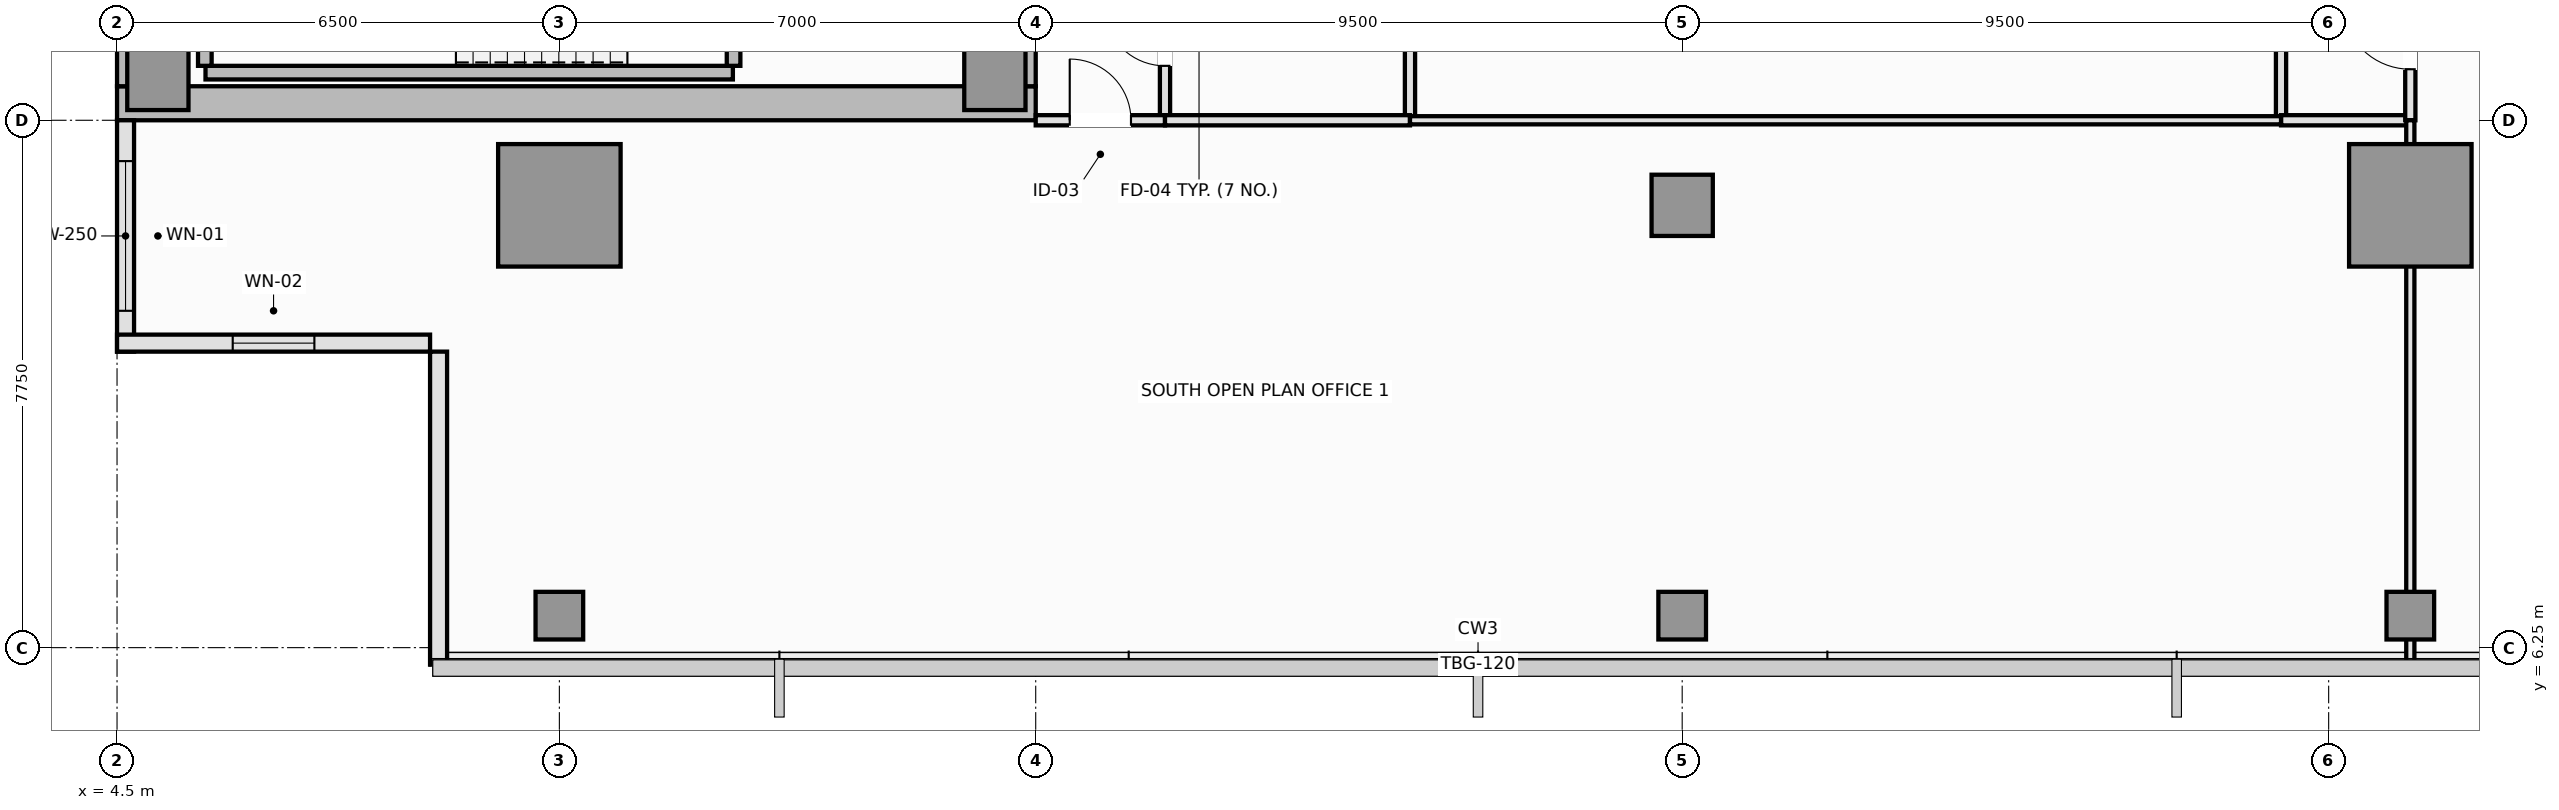
"""IFC4 building model, lengths in metres.
Left out: names, types, materials, properties, quantities, classifications, styles, units other than length and angle.
Written with IfcOpenShell. Run it as: python <this file> out.ifc"""

import sys

from ifc_helpers import new_model, si_unit, direction, frame, frame_2d, origin, origin_2d, place, context, subcontext, project, spatial, rectangle, extrude, element, fill, save


model = new_model("IFC4")
c1 = context("Model", 3, precision=1e-05, world=origin(), true_north=direction((0.0, 1.0)))
c2 = subcontext(c1, "Body", "Model", "MODEL_VIEW")
j1 = project(units=[si_unit("LENGTHUNIT", "METRE"), si_unit("PLANEANGLEUNIT", "RADIAN")], contexts=[c1])
p1 = place(None, origin())
s1 = spatial("IfcSite", under=j1, at=p1, CompositionType="ELEMENT")
p2 = place(p1, origin())
s2 = spatial("IfcBuilding", under=s1, at=p2, CompositionType="ELEMENT")
p3 = place(p2, frame((0.0, 0.0, 284.75)))
s3 = spatial("IfcBuildingStorey", under=s2, at=p3, CompositionType="ELEMENT", Elevation=284.75)
p4 = place(p3, frame((4.5, 14.25, 0.0), z_axis=(0.0, 0.0, 1.0), x_axis=(1.0, 0.0, 0.0)))
e1 = element("IfcWall", 1, at=p4, inside=s3, PredefinedType="SHEAR", context=c2, shape_type="SweptSolid", body=[
    extrude(rectangle(XDim=13.5, YDim=0.5, at=frame_2d((6.75, 0.0))), origin(), (0.0, 0.0, 1.0), 3.55),
])
p5 = place(p3, frame((4.75, 14.5, 0.0), z_axis=(0.0, 0.0, 1.0), x_axis=(0.0, 1.0, 0.0)))
e2 = element("IfcWall", 2, at=p5, inside=s3, PredefinedType="SHEAR", context=c2, shape_type="SweptSolid", body=[
    extrude(rectangle(XDim=21.5, YDim=0.5, at=frame_2d((10.75, 0.0))), origin(), (0.0, 0.0, 1.0), 3.55),
])
p6 = place(p3, frame((17.75, 14.5, 0.0), z_axis=(0.0, 0.0, 1.0), x_axis=(0.0, 1.0, 0.0)))
e3 = element("IfcWall", 3, at=p6, inside=s3, PredefinedType="SHEAR", context=c2, shape_type="SweptSolid", body=[
    extrude(rectangle(XDim=8.95, YDim=0.5, at=frame_2d((4.475, 0.0))), origin(), (0.0, 0.0, 1.0), 3.55),
])
p7 = place(p6, frame((4.4, 0.0, 0.0)))
e4 = element("IfcOpeningElement", 4, at=p7, cuts=e3, PredefinedType="OPENING", context=c2, shape_type="SweptSolid", body=[
    extrude(rectangle(XDim=1.1, YDim=2.15, at=frame_2d((0.55, 1.075))), frame((0.0, 0.26, 0.0), z_axis=(0.0, -1.0, 0.0), x_axis=(1.0, 0.0, 0.0)), (0.0, 0.0, 1.0), 0.52),
])
for number, where, z_axis, x_axis in (
    (5, (5.1, 14.6, 0.0), (0.0, 0.0, 1.0), (1.0, 0.0, 0.0)),
    (6, (17.4, 14.6, 0.0), (0.0, 0.0, 1.0), (1.0, 0.0, 0.0)),
):
    element("IfcColumn", number, at=place(p3, frame(where, z_axis=z_axis, x_axis=x_axis)), inside=s3, PredefinedType="PILASTER", context=c2, shape_type="SweptSolid", body=[
        extrude(rectangle(XDim=0.9, YDim=0.9, at=origin_2d()), origin(), (0.0, 0.0, 1.0), 3.55),
    ])
for number, where, z_axis, x_axis in (
    (7, (11.0, 12.75, 0.0), (0.0, 0.0, 1.0), (1.0, 0.0, 0.0)),
    (8, (38.2, 12.75, 0.0), (0.0, 0.0, 1.0), (1.0, 0.0, 0.0)),
):
    element("IfcColumn", number, at=place(p3, frame(where, z_axis=z_axis, x_axis=x_axis)), inside=s3, PredefinedType="COLUMN", context=c2, shape_type="SweptSolid", body=[
        extrude(rectangle(XDim=1.8, YDim=1.8, at=origin_2d()), origin(), (0.0, 0.0, 1.0), 3.55),
    ])
p8 = place(p3, frame((27.5, 12.75, 0.0), z_axis=(0.0, 0.0, 1.0), x_axis=(1.0, 0.0, 0.0)))
e9 = element("IfcColumn", 9, at=p8, inside=s3, PredefinedType="COLUMN", context=c2, shape_type="SweptSolid", body=[
    extrude(rectangle(XDim=0.9, YDim=0.9, at=origin_2d()), origin(), (0.0, 0.0, 1.0), 3.55),
])
for number, where, z_axis, x_axis in (
    (10, (11.0, 6.72, 0.0), (0.0, 0.0, 1.0), (1.0, 0.0, 0.0)),
    (11, (27.5, 6.72, 0.0), (0.0, 0.0, 1.0), (1.0, 0.0, 0.0)),
    (12, (38.2, 6.72, 0.0), (0.0, 0.0, 1.0), (1.0, 0.0, 0.0)),
):
    element("IfcColumn", number, at=place(p3, frame(where, z_axis=z_axis, x_axis=x_axis)), inside=s3, PredefinedType="COLUMN", context=c2, shape_type="SweptSolid", body=[
        extrude(rectangle(XDim=0.7, YDim=0.7, at=origin_2d()), origin(), (0.0, 0.0, 1.0), 3.55),
    ])
p9 = place(p3, frame((4.625, 14.0, 0.0), z_axis=(0.0, 0.0, 1.0), x_axis=(0.0, -1.0, 0.0)))
e13 = element("IfcWall", 13, at=p9, inside=s3, PredefinedType="SOLIDWALL", context=c2, shape_type="SweptSolid", body=[
    extrude(rectangle(XDim=3.4, YDim=0.25, at=frame_2d((1.7, 0.0))), origin(), (0.0, 0.0, 1.0), 3.39),
])
p10 = place(p9, frame((0.6, 0.0, 0.9)))
e14 = element("IfcOpeningElement", 14, at=p10, cuts=e13, PredefinedType="OPENING", context=c2, shape_type="SweptSolid", body=[
    extrude(rectangle(XDim=2.2, YDim=1.8, at=frame_2d((1.1, 0.9))), frame((0.0, 0.135, 0.0), z_axis=(0.0, -1.0, 0.0), x_axis=(1.0, 0.0, 0.0)), (0.0, 0.0, 1.0), 0.27),
])
p11 = place(p3, frame((4.5, 10.725, 0.0), z_axis=(0.0, 0.0, 1.0), x_axis=(1.0, 0.0, 0.0)))
e15 = element("IfcWall", 15, at=p11, inside=s3, PredefinedType="SOLIDWALL", context=c2, shape_type="SweptSolid", body=[
    extrude(rectangle(XDim=4.6, YDim=0.25, at=frame_2d((2.3, 0.0))), origin(), (0.0, 0.0, 1.0), 3.39),
])
p12 = place(p11, frame((1.7, 0.0, 0.9)))
e16 = element("IfcOpeningElement", 16, at=p12, cuts=e15, PredefinedType="OPENING", context=c2, shape_type="SweptSolid", body=[
    extrude(rectangle(XDim=1.2, YDim=1.8, at=frame_2d((0.6, 0.9))), frame((0.0, 0.135, 0.0), z_axis=(0.0, -1.0, 0.0), x_axis=(1.0, 0.0, 0.0)), (0.0, 0.0, 1.0), 0.27),
])
p13 = place(p3, frame((9.225, 10.6, 0.0), z_axis=(0.0, 0.0, 1.0), x_axis=(0.0, -1.0, 0.0)))
e17 = element("IfcWall", 17, at=p13, inside=s3, PredefinedType="SOLIDWALL", context=c2, shape_type="SweptSolid", body=[
    extrude(rectangle(XDim=4.6, YDim=0.25, at=frame_2d((2.3, 0.0))), origin(), (0.0, 0.0, 1.0), 3.39),
])
p14 = place(p3, frame((5.8, 14.7, 0.0), z_axis=(0.0, 0.0, 1.0), x_axis=(1.0, 0.0, 0.0)))
e18 = element("IfcWall", 18, at=p14, inside=s3, PredefinedType="SOLIDWALL", context=c2, shape_type="SweptSolid", body=[
    extrude(rectangle(XDim=7.75, YDim=0.2, at=frame_2d((3.875, 0.0))), origin(), (0.0, 0.0, 1.0), 3.55),
])
p15 = place(p3, frame((5.79, 14.8, 0.0), z_axis=(0.0, 0.0, 1.0), x_axis=(0.0, 1.0, 0.0)))
e19 = element("IfcWall", 19, at=p15, inside=s3, PredefinedType="SOLIDWALL", context=c2, shape_type="SweptSolid", body=[
    extrude(rectangle(XDim=3.05, YDim=0.2, at=frame_2d((1.525, 0.0))), origin(), (0.0, 0.0, 1.0), 3.55),
])
p16 = place(p3, frame((13.56, 14.8, 0.0), z_axis=(0.0, 0.0, 1.0), x_axis=(0.0, 1.0, 0.0)))
e20 = element("IfcWall", 20, at=p16, inside=s3, PredefinedType="SOLIDWALL", context=c2, shape_type="SweptSolid", body=[
    extrude(rectangle(XDim=3.05, YDim=0.2, at=frame_2d((1.525, 0.0))), origin(), (0.0, 0.0, 1.0), 3.55),
])
p17 = place(p16, frame((0.95, 0.0, 0.0)))
e21 = element("IfcOpeningElement", 21, at=p17, cuts=e20, PredefinedType="OPENING", context=c2, shape_type="SweptSolid", body=[
    extrude(rectangle(XDim=1.15, YDim=2.15, at=frame_2d((0.575, 1.075))), frame((0.0, 0.11, 0.0), z_axis=(0.0, -1.0, 0.0), x_axis=(1.0, 0.0, 0.0)), (0.0, 0.0, 1.0), 0.22),
])
p18 = place(p3, frame((19.9, 14.0, 0.0), z_axis=(0.0, 0.0, 1.0), x_axis=(0.0, 1.0, 0.0)))
e22 = element("IfcWall", 22, at=p18, inside=s3, PredefinedType="PLUMBINGWALL", context=c2, shape_type="SweptSolid", body=[
    extrude(rectangle(XDim=2.5, YDim=0.15, at=frame_2d((1.25, 0.0))), origin(), (0.0, 0.0, 1.0), 3.39),
])
p19 = place(p18, frame((0.8, 0.0, 0.0)))
e23 = element("IfcOpeningElement", 23, at=p19, cuts=e22, PredefinedType="OPENING", context=c2, shape_type="SweptSolid", body=[
    extrude(rectangle(XDim=0.9, YDim=2.1, at=frame_2d((0.45, 1.05))), frame((0.0, 0.085, 0.0), z_axis=(0.0, -1.0, 0.0), x_axis=(1.0, 0.0, 0.0)), (0.0, 0.0, 1.0), 0.17),
])
p20 = place(p3, frame((18.0, 14.0, 0.0), z_axis=(0.0, 0.0, 1.0), x_axis=(1.0, 0.0, 0.0)))
e24 = element("IfcWall", 24, at=p20, inside=s3, PredefinedType="PARTITIONING", context=c2, shape_type="SweptSolid", body=[
    extrude(rectangle(XDim=1.9, YDim=0.15, at=frame_2d((0.95, 0.0))), origin(), (0.0, 0.0, 1.0), 3.39),
])
p21 = place(p20, frame((0.5, 0.0, 0.0)))
e25 = element("IfcOpeningElement", 25, at=p21, cuts=e24, PredefinedType="OPENING", context=c2, shape_type="SweptSolid", body=[
    extrude(rectangle(XDim=0.9, YDim=2.1, at=frame_2d((0.45, 1.05))), frame((0.0, 0.085, 0.0), z_axis=(0.0, -1.0, 0.0), x_axis=(1.0, 0.0, 0.0)), (0.0, 0.0, 1.0), 0.17),
])
p22 = place(p3, frame((36.3, 14.0, 0.0), z_axis=(0.0, 0.0, 1.0), x_axis=(0.0, 1.0, 0.0)))
e26 = element("IfcWall", 26, at=p22, inside=s3, PredefinedType="PARTITIONING", context=c2, shape_type="SweptSolid", body=[
    extrude(rectangle(XDim=3.6, YDim=0.15, at=frame_2d((1.8, 0.0))), origin(), (0.0, 0.0, 1.0), 3.39),
])
p23 = place(p22, frame((1.3, 0.0, 0.0)))
e27 = element("IfcOpeningElement", 27, at=p23, cuts=e26, PredefinedType="OPENING", context=c2, shape_type="SweptSolid", body=[
    extrude(rectangle(XDim=1.0, YDim=2.15, at=frame_2d((0.5, 1.075))), frame((0.0, 0.085, 0.0), z_axis=(0.0, -1.0, 0.0), x_axis=(1.0, 0.0, 0.0)), (0.0, 0.0, 1.0), 0.17),
])
p24 = place(p3, frame((36.3, 14.0, 0.0), z_axis=(0.0, 0.0, 1.0), x_axis=(1.0, 0.0, 0.0)))
e28 = element("IfcWall", 28, at=p24, inside=s3, PredefinedType="PARTITIONING", context=c2, shape_type="SweptSolid", body=[
    extrude(rectangle(XDim=1.9, YDim=0.15, at=frame_2d((0.95, 0.0))), origin(), (0.0, 0.0, 1.0), 3.39),
])
p25 = place(p3, frame((38.2, 14.0, 0.0), z_axis=(0.0, 0.0, 1.0), x_axis=(0.0, 1.0, 0.0)))
e29 = element("IfcWall", 29, at=p25, inside=s3, PredefinedType="PARTITIONING", context=c2, shape_type="SweptSolid", body=[
    extrude(rectangle(XDim=2.5, YDim=0.15, at=frame_2d((1.25, 0.0))), origin(), (0.0, 0.0, 1.0), 2.99),
])
p26 = place(p25, frame((0.75, 0.0, 0.0)))
e30 = element("IfcOpeningElement", 30, at=p26, cuts=e29, PredefinedType="OPENING", context=c2, shape_type="SweptSolid", body=[
    extrude(rectangle(XDim=1.0, YDim=2.15, at=frame_2d((0.5, 1.075))), frame((0.0, 0.085, 0.0), z_axis=(0.0, -1.0, 0.0), x_axis=(1.0, 0.0, 0.0)), (0.0, 0.0, 1.0), 0.17),
])
p27 = place(p3, frame((23.5, 14.0, 0.0), z_axis=(0.0, 0.0, 1.0), x_axis=(0.0, 1.0, 0.0)))
e31 = element("IfcWall", 31, at=p27, inside=s3, PredefinedType="PLUMBINGWALL", context=c2, shape_type="SweptSolid", body=[
    extrude(rectangle(XDim=2.5, YDim=0.15, at=frame_2d((1.25, 0.0))), origin(), (0.0, 0.0, 1.0), 3.39),
])
p28 = place(p3, frame((19.9, 14.0, 0.0), z_axis=(0.0, 0.0, 1.0), x_axis=(1.0, 0.0, 0.0)))
e32 = element("IfcWall", 32, at=p28, inside=s3, PredefinedType="PLUMBINGWALL", context=c2, shape_type="SweptSolid", body=[
    extrude(rectangle(XDim=3.6, YDim=0.15, at=frame_2d((1.8, 0.0))), origin(), (0.0, 0.0, 1.0), 3.39),
])
p29 = place(p3, frame((23.5, 14.0, 0.0), z_axis=(0.0, 0.0, 1.0), x_axis=(1.0, 0.0, 0.0)))
e33 = element("IfcWall", 33, at=p29, inside=s3, PredefinedType="PARTITIONING", context=c2, shape_type="SweptSolid", body=[
    extrude(rectangle(XDim=12.8, YDim=0.12, at=frame_2d((6.4, 0.0))), origin(), (0.0, 0.0, 1.0), 3.39),
])
p30 = place(p3, frame((38.2, 6.01, 0.0), z_axis=(0.0, 0.0, 1.0), x_axis=(0.0, 1.0, 0.0)))
e34 = element("IfcWall", 34, at=p30, inside=s3, PredefinedType="PARTITIONING", context=c2, shape_type="SweptSolid", body=[
    extrude(rectangle(XDim=7.99, YDim=0.12, at=frame_2d((3.995, 0.0))), origin(), (0.0, 0.0, 1.0), 2.99),
])
p31 = place(p10, origin())
e35 = element("IfcWindow", 35, at=p31, inside=s3, PartitioningType="SINGLE_PANEL", PredefinedType="WINDOW", context=c2, shape_type="SweptSolid", body=[
    extrude(rectangle(XDim=2.2, YDim=1.8, at=frame_2d((1.1, 0.9))), frame((0.0, 0.03, 0.0), z_axis=(0.0, -1.0, 0.0), x_axis=(1.0, 0.0, 0.0)), (0.0, 0.0, 1.0), 0.06),
])
fill(e14, e35)
p32 = place(p12, origin())
e36 = element("IfcWindow", 36, at=p32, inside=s3, PartitioningType="SINGLE_PANEL", PredefinedType="WINDOW", context=c2, shape_type="SweptSolid", body=[
    extrude(rectangle(XDim=1.2, YDim=1.8, at=frame_2d((0.6, 0.9))), frame((0.0, 0.03, 0.0), z_axis=(0.0, -1.0, 0.0), x_axis=(1.0, 0.0, 0.0)), (0.0, 0.0, 1.0), 0.06),
])
fill(e16, e36)
p33 = place(p19, origin())
e37 = element("IfcDoor", 37, at=p33, inside=s3, OperationType="SINGLE_SWING_RIGHT", PredefinedType="DOOR", context=c2, shape_type="SweptSolid", body=[
    extrude(rectangle(XDim=0.9, YDim=2.1, at=frame_2d((0.45, 1.05))), frame((0.0, 0.025, 0.0), z_axis=(0.0, -1.0, 0.0), x_axis=(1.0, 0.0, 0.0)), (0.0, 0.0, 1.0), 0.05),
])
fill(e23, e37)
p34 = place(p21, origin())
e38 = element("IfcDoor", 38, at=p34, inside=s3, OperationType="SINGLE_SWING_LEFT", PredefinedType="DOOR", context=c2, shape_type="SweptSolid", body=[
    extrude(rectangle(XDim=0.9, YDim=2.1, at=frame_2d((0.45, 1.05))), frame((0.0, 0.025, 0.0), z_axis=(0.0, -1.0, 0.0), x_axis=(1.0, 0.0, 0.0)), (0.0, 0.0, 1.0), 0.05),
])
fill(e25, e38)
p35 = place(p26, origin())
e39 = element("IfcDoor", 39, at=p35, inside=s3, OperationType="SINGLE_SWING_RIGHT", PredefinedType="DOOR", context=c2, shape_type="SweptSolid", body=[
    extrude(rectangle(XDim=1.0, YDim=2.15, at=frame_2d((0.5, 1.075))), frame((0.0, 0.025, 0.0), z_axis=(0.0, -1.0, 0.0), x_axis=(1.0, 0.0, 0.0)), (0.0, 0.0, 1.0), 0.05),
])
fill(e30, e39)
save(model, sys.argv[1])
